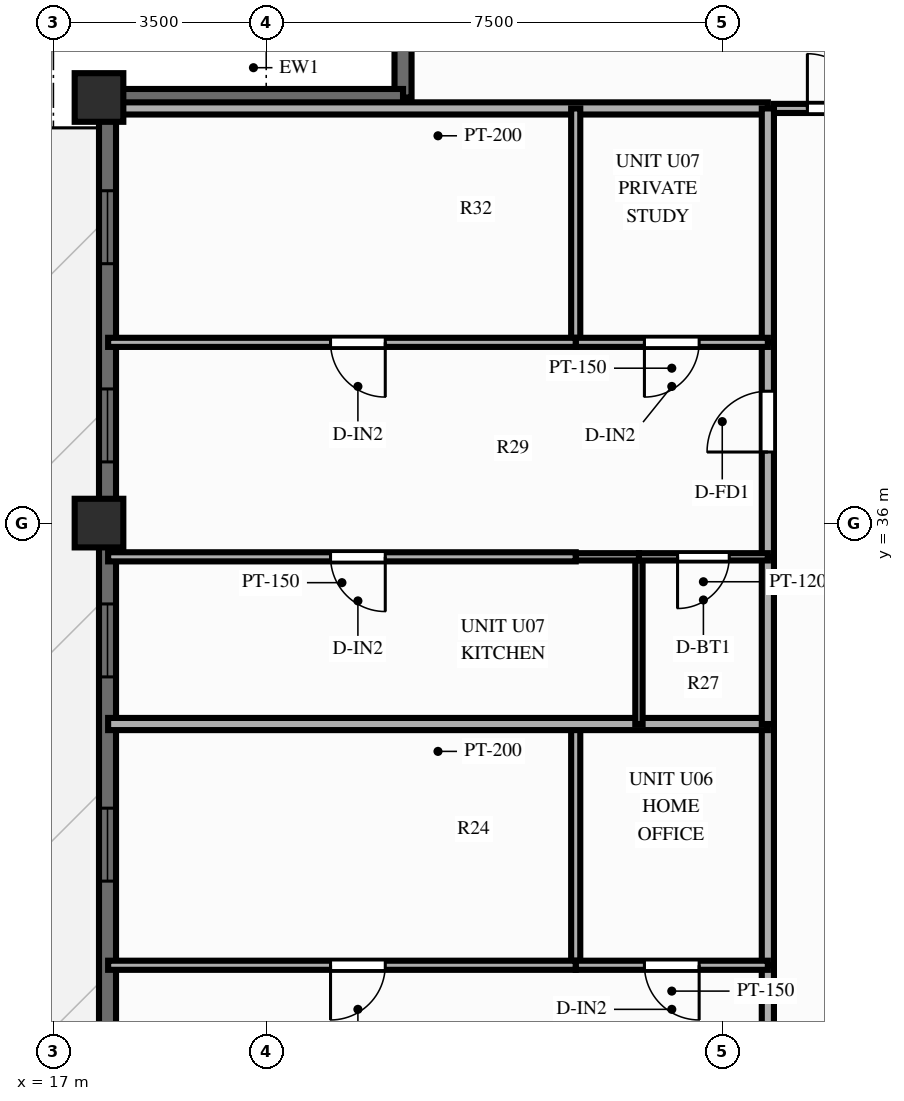
"""IFC4 building model, lengths in metres.
Left out: names, types, materials, properties, quantities, classifications, styles, units other than length and angle.
Written with IfcOpenShell. Run it as: python <this file> out.ifc"""

import sys

from ifc_helpers import new_model, si_unit, direction, frame, frame_2d, origin, origin_2d, place, context, subcontext, project, spatial, rectangle, extrude, source, transform, mapped, element, fill, save


model = new_model("IFC4")
c1 = context("Model", 3, precision=1e-05, world=origin(), true_north=direction((0.0, 1.0)))
c2 = subcontext(c1, "Body", "Model", "MODEL_VIEW")
j1 = project(units=[si_unit("LENGTHUNIT", "METRE"), si_unit("PLANEANGLEUNIT", "RADIAN")], contexts=[c1])
p1 = place(None, origin())
s1 = spatial("IfcSite", under=j1, at=p1, CompositionType="ELEMENT")
p2 = place(p1, origin())
s2 = spatial("IfcBuilding", under=s1, at=p2, CompositionType="ELEMENT")
p3 = place(p2, frame((0.0, 0.0, 179.8)))
s3 = spatial("IfcBuildingStorey", under=s2, at=p3, CompositionType="ELEMENT", Elevation=179.8)
m1 = source(origin(), c2, "Body", "SweptSolid", [
    extrude(rectangle(XDim=0.8, YDim=0.8, at=origin_2d()), origin(), (0.0, 0.0, 1.0), 3.0),
])
for number, where, z_axis, x_axis in (
    (1, (17.75, 43.0, 0.0), (0.0, 0.0, 1.0), (1.0, 0.0, 0.0)),
    (2, (17.75, 36.0, 0.0), (0.0, 0.0, 1.0), (1.0, 0.0, 0.0)),
):
    element("IfcColumn", number, at=place(p3, frame(where, z_axis=z_axis, x_axis=x_axis)), inside=s3, PredefinedType="COLUMN", context=c2, shape_type="MappedRepresentation", body=[
        mapped(m1, transform((0.0, 0.0, 0.0), scale=1.0)),
    ])
p4 = place(p3, frame((17.89, 11.0, 0.0), z_axis=(0.0, 0.0, 1.0), x_axis=(0.0, 1.0, 0.0)))
e3 = element("IfcWall", 3, at=p4, inside=s3, PredefinedType="SOLIDWALL", context=c2, shape_type="SweptSolid", body=[
    extrude(rectangle(XDim=32.0, YDim=0.28, at=frame_2d((16.0, 0.0))), origin(), (0.0, 0.0, 1.0), 2.28),
])
p5 = place(p4, frame((0.985, 0.0, 0.25)))
e4 = element("IfcOpeningElement", 4, at=p5, cuts=e3, PredefinedType="OPENING", context=c2, shape_type="SweptSolid", body=[
    extrude(rectangle(XDim=1.2, YDim=1.5, at=frame_2d((0.6, 0.75))), frame((0.0, 0.152, 0.0), z_axis=(0.0, -1.0, 0.0), x_axis=(1.0, 0.0, 0.0)), (0.0, 0.0, 1.0), 0.304),
])
p6 = place(p4, frame((4.245, 0.0, 0.25)))
e5 = element("IfcOpeningElement", 5, at=p6, cuts=e3, PredefinedType="OPENING", context=c2, shape_type="SweptSolid", body=[
    extrude(rectangle(XDim=1.2, YDim=1.5, at=frame_2d((0.6, 0.75))), frame((0.0, 0.152, 0.0), z_axis=(0.0, -1.0, 0.0), x_axis=(1.0, 0.0, 0.0)), (0.0, 0.0, 1.0), 0.304),
])
p7 = place(p4, frame((8.667, 0.0, 0.25)))
e6 = element("IfcOpeningElement", 6, at=p7, cuts=e3, PredefinedType="OPENING", context=c2, shape_type="SweptSolid", body=[
    extrude(rectangle(XDim=1.2, YDim=1.5, at=frame_2d((0.6, 0.75))), frame((0.0, 0.152, 0.0), z_axis=(0.0, -1.0, 0.0), x_axis=(1.0, 0.0, 0.0)), (0.0, 0.0, 1.0), 0.304),
])
p8 = place(p4, frame((12.029, 0.0, 0.25)))
e7 = element("IfcOpeningElement", 7, at=p8, cuts=e3, PredefinedType="OPENING", context=c2, shape_type="SweptSolid", body=[
    extrude(rectangle(XDim=1.2, YDim=1.5, at=frame_2d((0.6, 0.75))), frame((0.0, 0.152, 0.0), z_axis=(0.0, -1.0, 0.0), x_axis=(1.0, 0.0, 0.0)), (0.0, 0.0, 1.0), 0.304),
])
p9 = place(p4, frame((15.066, 0.0, 0.0)))
e8 = element("IfcOpeningElement", 8, at=p9, cuts=e3, PredefinedType="OPENING", context=c2, shape_type="SweptSolid", body=[
    extrude(rectangle(XDim=1.6, YDim=2.15, at=frame_2d((0.8, 1.075))), frame((0.0, 0.152, 0.0), z_axis=(0.0, -1.0, 0.0), x_axis=(1.0, 0.0, 0.0)), (0.0, 0.0, 1.0), 0.304),
])
p10 = place(p4, frame((19.111, 0.0, 0.25)))
e9 = element("IfcOpeningElement", 9, at=p10, cuts=e3, PredefinedType="OPENING", context=c2, shape_type="SweptSolid", body=[
    extrude(rectangle(XDim=1.2, YDim=1.5, at=frame_2d((0.6, 0.75))), frame((0.0, 0.152, 0.0), z_axis=(0.0, -1.0, 0.0), x_axis=(1.0, 0.0, 0.0)), (0.0, 0.0, 1.0), 0.304),
])
p11 = place(p4, frame((22.47, 0.0, 0.25)))
e10 = element("IfcOpeningElement", 10, at=p11, cuts=e3, PredefinedType="OPENING", context=c2, shape_type="SweptSolid", body=[
    extrude(rectangle(XDim=1.2, YDim=1.5, at=frame_2d((0.6, 0.75))), frame((0.0, 0.152, 0.0), z_axis=(0.0, -1.0, 0.0), x_axis=(1.0, 0.0, 0.0)), (0.0, 0.0, 1.0), 0.304),
])
p12 = place(p4, frame((26.006, 0.0, 0.25)))
e11 = element("IfcOpeningElement", 11, at=p12, cuts=e3, PredefinedType="OPENING", context=c2, shape_type="SweptSolid", body=[
    extrude(rectangle(XDim=1.2, YDim=1.5, at=frame_2d((0.6, 0.75))), frame((0.0, 0.152, 0.0), z_axis=(0.0, -1.0, 0.0), x_axis=(1.0, 0.0, 0.0)), (0.0, 0.0, 1.0), 0.304),
])
p13 = place(p4, frame((29.266, 0.0, 0.25)))
e12 = element("IfcOpeningElement", 12, at=p13, cuts=e3, PredefinedType="OPENING", context=c2, shape_type="SweptSolid", body=[
    extrude(rectangle(XDim=1.2, YDim=1.5, at=frame_2d((0.6, 0.75))), frame((0.0, 0.152, 0.0), z_axis=(0.0, -1.0, 0.0), x_axis=(1.0, 0.0, 0.0)), (0.0, 0.0, 1.0), 0.304),
])
for number, where, z_axis, x_axis in (
    (13, (22.75, 43.0, 0.0), (0.0, 0.0, 1.0), (0.0, 1.0, 0.0)),
    (14, (17.83, 43.0, 0.0), (0.0, 0.0, 1.0), (1.0, 0.0, 0.0)),
):
    element("IfcWall", number, at=place(p3, frame(where, z_axis=z_axis, x_axis=x_axis)), inside=s3, PredefinedType="SOLIDWALL", context=c2, shape_type="SweptSolid", body=[
        extrude(rectangle(XDim=4.92, YDim=0.28, at=frame_2d((2.46, 0.0))), origin(), (0.0, 0.0, 1.0), 2.28),
    ])
p14 = place(p3, frame((28.85, 42.82, 0.0), z_axis=(0.0, 0.0, 1.0), x_axis=(1.0, 0.0, 0.0)))
e15 = element("IfcWall", 15, at=p14, inside=s3, PredefinedType="PARTITIONING", context=c2, shape_type="SweptSolid", body=[
    extrude(rectangle(XDim=2.33, YDim=0.15, at=frame_2d((1.165, 0.0))), origin(), (0.0, 0.0, 1.0), 2.79),
])
p15 = place(p14, frame((0.55, 0.0, 0.0)))
e16 = element("IfcOpeningElement", 16, at=p15, cuts=e15, PredefinedType="OPENING", context=c2, shape_type="SweptSolid", body=[
    extrude(rectangle(XDim=0.9, YDim=2.1, at=frame_2d((0.45, 1.05))), frame((0.0, 0.087, 0.0), z_axis=(0.0, -1.0, 0.0), x_axis=(1.0, 0.0, 0.0)), (0.0, 0.0, 1.0), 0.174),
])
p16 = place(p3, frame((28.75, 42.82, 0.0), z_axis=(0.0, 0.0, 1.0), x_axis=(-1.0, 0.0, 0.0)))
e17 = element("IfcWall", 17, at=p16, inside=s3, PredefinedType="PARTITIONING", context=c2, shape_type="SweptSolid", body=[
    extrude(rectangle(XDim=10.85, YDim=0.2, at=frame_2d((5.425, 0.0))), origin(), (0.0, 0.0, 1.0), 2.79),
])
p17 = place(p3, frame((28.75, 25.004, 0.0), z_axis=(0.0, 0.0, 1.0), x_axis=(0.0, 1.0, 0.0)))
e18 = element("IfcWall", 18, at=p17, inside=s3, PredefinedType="PARTITIONING", context=c2, shape_type="SweptSolid", body=[
    extrude(rectangle(XDim=3.724, YDim=0.2, at=frame_2d((1.862, 0.0))), origin(), (0.0, 0.0, 1.0), 2.79),
])
p18 = place(p17, frame((1.362, 0.0, 0.0)))
e19 = element("IfcOpeningElement", 19, at=p18, cuts=e18, PredefinedType="OPENING", context=c2, shape_type="SweptSolid", body=[
    extrude(rectangle(XDim=1.0, YDim=2.15, at=frame_2d((0.5, 1.075))), frame((0.0, 0.112, 0.0), z_axis=(0.0, -1.0, 0.0), x_axis=(1.0, 0.0, 0.0)), (0.0, 0.0, 1.0), 0.224),
])
p19 = place(p3, frame((28.75, 28.728, 0.0), z_axis=(0.0, 0.0, 1.0), x_axis=(0.0, 1.0, 0.0)))
e20 = element("IfcWall", 20, at=p19, inside=s3, PredefinedType="PARTITIONING", context=c2, shape_type="SweptSolid", body=[
    extrude(rectangle(XDim=3.968, YDim=0.2, at=frame_2d((1.984, 0.0))), origin(), (0.0, 0.0, 1.0), 2.79),
])
p20 = place(p3, frame((25.59, 28.728, 0.0), z_axis=(0.0, 0.0, 1.0), x_axis=(0.0, 1.0, 0.0)))
e21 = element("IfcWall", 21, at=p20, inside=s3, PredefinedType="PARTITIONING", context=c2, shape_type="SweptSolid", body=[
    extrude(rectangle(XDim=3.968, YDim=0.15, at=frame_2d((1.984, 0.0))), origin(), (0.0, 0.0, 1.0), 2.79),
])
p21 = place(p3, frame((28.75, 28.728, 0.0), z_axis=(0.0, 0.0, 1.0), x_axis=(-1.0, 0.0, 0.0)))
e22 = element("IfcWall", 22, at=p21, inside=s3, PredefinedType="PARTITIONING", context=c2, shape_type="SweptSolid", body=[
    extrude(rectangle(XDim=3.16, YDim=0.15, at=frame_2d((1.58, 0.0))), origin(), (0.0, 0.0, 1.0), 2.79),
])
p22 = place(p21, frame((1.13, 0.0, 0.0)))
e23 = element("IfcOpeningElement", 23, at=p22, cuts=e22, PredefinedType="OPENING", context=c2, shape_type="SweptSolid", body=[
    extrude(rectangle(XDim=0.9, YDim=2.1, at=frame_2d((0.45, 1.05))), frame((0.0, 0.087, 0.0), z_axis=(0.0, -1.0, 0.0), x_axis=(1.0, 0.0, 0.0)), (0.0, 0.0, 1.0), 0.174),
])
p23 = place(p3, frame((25.59, 28.728, 0.0), z_axis=(0.0, 0.0, 1.0), x_axis=(-1.0, 0.0, 0.0)))
e24 = element("IfcWall", 24, at=p23, inside=s3, PredefinedType="PARTITIONING", context=c2, shape_type="SweptSolid", body=[
    extrude(rectangle(XDim=7.69, YDim=0.15, at=frame_2d((3.845, 0.0))), origin(), (0.0, 0.0, 1.0), 2.79),
])
p24 = place(p23, frame((3.132, 0.0, 0.0)))
e25 = element("IfcOpeningElement", 25, at=p24, cuts=e24, PredefinedType="OPENING", context=c2, shape_type="SweptSolid", body=[
    extrude(rectangle(XDim=0.9, YDim=2.1, at=frame_2d((0.45, 1.05))), frame((0.0, 0.087, 0.0), z_axis=(0.0, -1.0, 0.0), x_axis=(1.0, 0.0, 0.0)), (0.0, 0.0, 1.0), 0.174),
])
p25 = place(p3, frame((28.75, 32.695, 0.0), z_axis=(0.0, 0.0, 1.0), x_axis=(-1.0, 0.0, 0.0)))
e26 = element("IfcWall", 26, at=p25, inside=s3, PredefinedType="PARTITIONING", context=c2, shape_type="SweptSolid", body=[
    extrude(rectangle(XDim=10.85, YDim=0.2, at=frame_2d((5.425, 0.0))), origin(), (0.0, 0.0, 1.0), 2.79),
])
p26 = place(p3, frame((28.75, 32.695, 0.0), z_axis=(0.0, 0.0, 1.0), x_axis=(0.0, 1.0, 0.0)))
e27 = element("IfcWall", 27, at=p26, inside=s3, PredefinedType="PARTITIONING", context=c2, shape_type="SweptSolid", body=[
    extrude(rectangle(XDim=2.75, YDim=0.2, at=frame_2d((1.375, 0.0))), origin(), (0.0, 0.0, 1.0), 2.79),
])
p27 = place(p3, frame((28.75, 35.445, 0.0), z_axis=(0.0, 0.0, 1.0), x_axis=(0.0, 1.0, 0.0)))
e28 = element("IfcWall", 28, at=p27, inside=s3, PredefinedType="PARTITIONING", context=c2, shape_type="SweptSolid", body=[
    extrude(rectangle(XDim=3.527, YDim=0.2, at=frame_2d((1.764, 0.0))), origin(), (0.0, 0.0, 1.0), 2.79),
])
p28 = place(p27, frame((1.724, 0.0, 0.0)))
e29 = element("IfcOpeningElement", 29, at=p28, cuts=e28, PredefinedType="OPENING", context=c2, shape_type="SweptSolid", body=[
    extrude(rectangle(XDim=1.0, YDim=2.15, at=frame_2d((0.5, 1.075))), frame((0.0, 0.112, 0.0), z_axis=(0.0, -1.0, 0.0), x_axis=(1.0, 0.0, 0.0)), (0.0, 0.0, 1.0), 0.224),
])
p29 = place(p3, frame((28.75, 38.973, 0.0), z_axis=(0.0, 0.0, 1.0), x_axis=(0.0, 1.0, 0.0)))
e30 = element("IfcWall", 30, at=p29, inside=s3, PredefinedType="PARTITIONING", context=c2, shape_type="SweptSolid", body=[
    extrude(rectangle(XDim=3.847, YDim=0.2, at=frame_2d((1.924, 0.0))), origin(), (0.0, 0.0, 1.0), 2.79),
])
p30 = place(p3, frame((26.63, 32.695, 0.0), z_axis=(0.0, 0.0, 1.0), x_axis=(0.0, 1.0, 0.0)))
e31 = element("IfcWall", 31, at=p30, inside=s3, PredefinedType="PARTITIONING", context=c2, shape_type="SweptSolid", body=[
    extrude(rectangle(XDim=2.75, YDim=0.12, at=frame_2d((1.375, 0.0))), origin(), (0.0, 0.0, 1.0), 2.79),
])
p31 = place(p3, frame((25.59, 38.973, 0.0), z_axis=(0.0, 0.0, 1.0), x_axis=(0.0, 1.0, 0.0)))
e32 = element("IfcWall", 32, at=p31, inside=s3, PredefinedType="PARTITIONING", context=c2, shape_type="SweptSolid", body=[
    extrude(rectangle(XDim=3.847, YDim=0.15, at=frame_2d((1.924, 0.0))), origin(), (0.0, 0.0, 1.0), 2.79),
])
p32 = place(p3, frame((28.75, 35.445, 0.0), z_axis=(0.0, 0.0, 1.0), x_axis=(-1.0, 0.0, 0.0)))
e33 = element("IfcWall", 33, at=p32, inside=s3, PredefinedType="PARTITIONING", context=c2, shape_type="SweptSolid", body=[
    extrude(rectangle(XDim=2.12, YDim=0.12, at=frame_2d((1.06, 0.0))), origin(), (0.0, 0.0, 1.0), 2.79),
])
p33 = place(p32, frame((0.635, 0.0, 0.0)))
e34 = element("IfcOpeningElement", 34, at=p33, cuts=e33, PredefinedType="OPENING", context=c2, shape_type="SweptSolid", body=[
    extrude(rectangle(XDim=0.85, YDim=2.05, at=frame_2d((0.425, 1.025))), frame((0.0, 0.072, 0.0), z_axis=(0.0, -1.0, 0.0), x_axis=(1.0, 0.0, 0.0)), (0.0, 0.0, 1.0), 0.144),
])
p34 = place(p3, frame((26.63, 35.445, 0.0), z_axis=(0.0, 0.0, 1.0), x_axis=(-1.0, 0.0, 0.0)))
e35 = element("IfcWall", 35, at=p34, inside=s3, PredefinedType="PARTITIONING", context=c2, shape_type="SweptSolid", body=[
    extrude(rectangle(XDim=1.04, YDim=0.12, at=frame_2d((0.52, 0.0))), origin(), (0.0, 0.0, 1.0), 2.79),
])
p35 = place(p3, frame((25.59, 35.445, 0.0), z_axis=(0.0, 0.0, 1.0), x_axis=(-1.0, 0.0, 0.0)))
e36 = element("IfcWall", 36, at=p35, inside=s3, PredefinedType="PARTITIONING", context=c2, shape_type="SweptSolid", body=[
    extrude(rectangle(XDim=7.69, YDim=0.15, at=frame_2d((3.845, 0.0))), origin(), (0.0, 0.0, 1.0), 2.79),
])
p36 = place(p35, frame((3.132, 0.0, 0.0)))
e37 = element("IfcOpeningElement", 37, at=p36, cuts=e36, PredefinedType="OPENING", context=c2, shape_type="SweptSolid", body=[
    extrude(rectangle(XDim=0.9, YDim=2.1, at=frame_2d((0.45, 1.05))), frame((0.0, 0.087, 0.0), z_axis=(0.0, -1.0, 0.0), x_axis=(1.0, 0.0, 0.0)), (0.0, 0.0, 1.0), 0.174),
])
p37 = place(p3, frame((28.75, 38.973, 0.0), z_axis=(0.0, 0.0, 1.0), x_axis=(-1.0, 0.0, 0.0)))
e38 = element("IfcWall", 38, at=p37, inside=s3, PredefinedType="PARTITIONING", context=c2, shape_type="SweptSolid", body=[
    extrude(rectangle(XDim=3.16, YDim=0.15, at=frame_2d((1.58, 0.0))), origin(), (0.0, 0.0, 1.0), 2.79),
])
p38 = place(p37, frame((1.13, 0.0, 0.0)))
e39 = element("IfcOpeningElement", 39, at=p38, cuts=e38, PredefinedType="OPENING", context=c2, shape_type="SweptSolid", body=[
    extrude(rectangle(XDim=0.9, YDim=2.1, at=frame_2d((0.45, 1.05))), frame((0.0, 0.087, 0.0), z_axis=(0.0, -1.0, 0.0), x_axis=(1.0, 0.0, 0.0)), (0.0, 0.0, 1.0), 0.174),
])
p39 = place(p3, frame((25.59, 38.973, 0.0), z_axis=(0.0, 0.0, 1.0), x_axis=(-1.0, 0.0, 0.0)))
e40 = element("IfcWall", 40, at=p39, inside=s3, PredefinedType="PARTITIONING", context=c2, shape_type="SweptSolid", body=[
    extrude(rectangle(XDim=7.69, YDim=0.15, at=frame_2d((3.845, 0.0))), origin(), (0.0, 0.0, 1.0), 2.79),
])
p40 = place(p39, frame((3.132, 0.0, 0.0)))
e41 = element("IfcOpeningElement", 41, at=p40, cuts=e40, PredefinedType="OPENING", context=c2, shape_type="SweptSolid", body=[
    extrude(rectangle(XDim=0.9, YDim=2.1, at=frame_2d((0.45, 1.05))), frame((0.0, 0.087, 0.0), z_axis=(0.0, -1.0, 0.0), x_axis=(1.0, 0.0, 0.0)), (0.0, 0.0, 1.0), 0.174),
])
m2 = source(origin(), c2, "Body", "SweptSolid", [
    extrude(rectangle(XDim=1.2, YDim=1.5, at=frame_2d((0.6, 0.75))), frame((0.0, 0.03, 0.0), z_axis=(0.0, -1.0, 0.0), x_axis=(1.0, 0.0, 0.0)), (0.0, 0.0, 1.0), 0.06),
])
p41 = place(p10, origin())
e42 = element("IfcWindow", 42, at=p41, inside=s3, PartitioningType="SINGLE_PANEL", PredefinedType="WINDOW", context=c2, shape_type="MappedRepresentation", body=[
    mapped(m2, transform((0.0, 0.0, 0.0), scale=1.0)),
])
fill(e9, e42)
p42 = place(p11, origin())
e43 = element("IfcWindow", 43, at=p42, inside=s3, PartitioningType="SINGLE_PANEL", PredefinedType="WINDOW", context=c2, shape_type="MappedRepresentation", body=[
    mapped(m2, transform((0.0, 0.0, 0.0), scale=1.0)),
])
fill(e10, e43)
p43 = place(p12, origin())
e44 = element("IfcWindow", 44, at=p43, inside=s3, PartitioningType="SINGLE_PANEL", PredefinedType="WINDOW", context=c2, shape_type="MappedRepresentation", body=[
    mapped(m2, transform((0.0, 0.0, 0.0), scale=1.0)),
])
fill(e11, e44)
p44 = place(p13, origin())
e45 = element("IfcWindow", 45, at=p44, inside=s3, PartitioningType="SINGLE_PANEL", PredefinedType="WINDOW", context=c2, shape_type="MappedRepresentation", body=[
    mapped(m2, transform((0.0, 0.0, 0.0), scale=1.0)),
])
fill(e12, e45)
m3 = source(origin(), c2, "Body", "SweptSolid", [
    extrude(rectangle(XDim=0.9, YDim=2.1, at=frame_2d((0.45, 1.05))), frame((0.0, 0.025, 0.0), z_axis=(0.0, -1.0, 0.0), x_axis=(1.0, 0.0, 0.0)), (0.0, 0.0, 1.0), 0.05),
])
p45 = place(p15, origin())
e46 = element("IfcDoor", 46, at=p45, inside=s3, OperationType="SINGLE_SWING_LEFT", PredefinedType="DOOR", context=c2, shape_type="MappedRepresentation", body=[
    mapped(m3, transform((0.0, 0.0, 0.0), scale=1.0)),
])
fill(e16, e46)
p46 = place(p22, origin())
e47 = element("IfcDoor", 47, at=p46, inside=s3, OperationType="SINGLE_SWING_LEFT", PredefinedType="DOOR", context=c2, shape_type="MappedRepresentation", body=[
    mapped(m3, transform((0.0, 0.0, 0.0), scale=1.0)),
])
fill(e23, e47)
p47 = place(p24, origin())
e48 = element("IfcDoor", 48, at=p47, inside=s3, OperationType="SINGLE_SWING_RIGHT", PredefinedType="DOOR", context=c2, shape_type="MappedRepresentation", body=[
    mapped(m3, transform((0.0, 0.0, 0.0), scale=1.0)),
])
fill(e25, e48)
m4 = source(origin(), c2, "Body", "SweptSolid", [
    extrude(rectangle(XDim=1.0, YDim=2.15, at=frame_2d((0.5, 1.075))), frame((0.0, 0.025, 0.0), z_axis=(0.0, -1.0, 0.0), x_axis=(1.0, 0.0, 0.0)), (0.0, 0.0, 1.0), 0.05),
])
p48 = place(p28, origin())
e49 = element("IfcDoor", 49, at=p48, inside=s3, OperationType="SINGLE_SWING_LEFT", PredefinedType="DOOR", context=c2, shape_type="MappedRepresentation", body=[
    mapped(m4, transform((0.0, 0.0, 0.0), scale=1.0)),
])
fill(e29, e49)
m5 = source(origin(), c2, "Body", "SweptSolid", [
    extrude(rectangle(XDim=0.85, YDim=2.05, at=frame_2d((0.425, 1.025))), frame((0.0, 0.025, 0.0), z_axis=(0.0, -1.0, 0.0), x_axis=(1.0, 0.0, 0.0)), (0.0, 0.0, 1.0), 0.05),
])
p49 = place(p33, origin())
e50 = element("IfcDoor", 50, at=p49, inside=s3, OperationType="SINGLE_SWING_RIGHT", PredefinedType="DOOR", context=c2, shape_type="MappedRepresentation", body=[
    mapped(m5, transform((0.0, 0.0, 0.0), scale=1.0)),
])
fill(e34, e50)
p50 = place(p36, origin())
e51 = element("IfcDoor", 51, at=p50, inside=s3, OperationType="SINGLE_SWING_LEFT", PredefinedType="DOOR", context=c2, shape_type="MappedRepresentation", body=[
    mapped(m3, transform((0.0, 0.0, 0.0), scale=1.0)),
])
fill(e37, e51)
p51 = place(p38, origin())
e52 = element("IfcDoor", 52, at=p51, inside=s3, OperationType="SINGLE_SWING_RIGHT", PredefinedType="DOOR", context=c2, shape_type="MappedRepresentation", body=[
    mapped(m3, transform((0.0, 0.0, 0.0), scale=1.0)),
])
fill(e39, e52)
p52 = place(p40, origin())
e53 = element("IfcDoor", 53, at=p52, inside=s3, OperationType="SINGLE_SWING_LEFT", PredefinedType="DOOR", context=c2, shape_type="MappedRepresentation", body=[
    mapped(m3, transform((0.0, 0.0, 0.0), scale=1.0)),
])
fill(e41, e53)
save(model, sys.argv[1])
